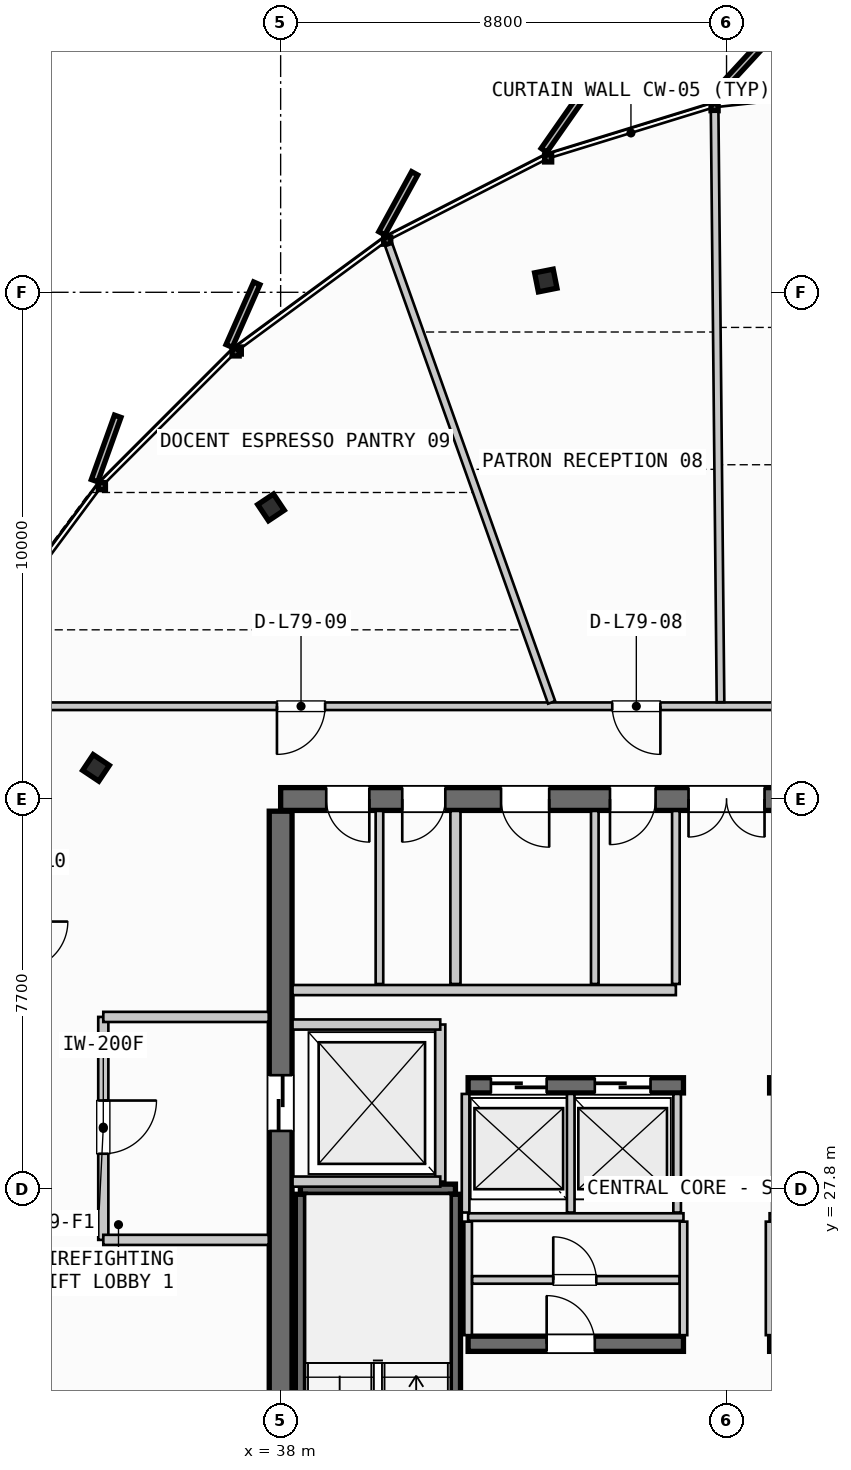
"""IFC4 building model, lengths in metres.
Left out: names, types, materials, properties, quantities, classifications, styles, units other than length and angle.
Written with IfcOpenShell. Run it as: python <this file> out.ifc"""

import sys

from ifc_helpers import new_model, si_unit, direction, frame, frame_2d, origin, origin_2d, place, context, subcontext, project, spatial, rectangle, i_section, extrude, source, transform, mapped, element, fill, save


model = new_model("IFC4")
c1 = context("Model", 3, precision=1e-05, world=origin(), true_north=direction((0.0, 1.0)))
c2 = subcontext(c1, "Body", "Model", "MODEL_VIEW")
j1 = project(units=[si_unit("LENGTHUNIT", "METRE"), si_unit("PLANEANGLEUNIT", "RADIAN")], contexts=[c1])
p1 = place(None, origin())
s1 = spatial("IfcSite", under=j1, at=p1, CompositionType="ELEMENT")
p2 = place(p1, origin())
s2 = spatial("IfcBuilding", under=s1, at=p2, CompositionType="ELEMENT")
p3 = place(p2, frame((0.0, 0.0, 297.4)))
s3 = spatial("IfcBuildingStorey", under=s2, at=p3, CompositionType="ELEMENT", Elevation=297.4)
p4 = place(p3, frame((55.6, 35.5, 0.0), z_axis=(0.0, 0.0, 1.0), x_axis=(-1.0, 0.0, 0.0)))
e1 = element("IfcWall", 1, at=p4, inside=s3, PredefinedType="SHEAR", context=c2, shape_type="SweptSolid", body=[
    extrude(rectangle(XDim=17.6, YDim=0.45, at=frame_2d((8.8, 0.0))), origin(), (0.0, 0.0, 1.0), 3.21),
])
p5 = place(p4, frame((8.05, 0.0, 0.0)))
e2 = element("IfcOpeningElement", 2, at=p5, cuts=e1, PredefinedType="OPENING", context=c2, shape_type="SweptSolid", body=[
    extrude(rectangle(XDim=1.5, YDim=2.2, at=frame_2d((0.75, 1.1))), frame((0.0, 0.235, 0.0), z_axis=(0.0, -1.0, 0.0), x_axis=(1.0, 0.0, 0.0)), (0.0, 0.0, 1.0), 0.47),
])
p6 = place(p4, frame((15.85, 0.0, 0.0)))
e3 = element("IfcOpeningElement", 3, at=p6, cuts=e1, PredefinedType="OPENING", context=c2, shape_type="SweptSolid", body=[
    extrude(rectangle(XDim=0.85, YDim=2.15, at=frame_2d((0.425, 1.075))), frame((0.0, 0.235, 0.0), z_axis=(0.0, -1.0, 0.0), x_axis=(1.0, 0.0, 0.0)), (0.0, 0.0, 1.0), 0.47),
])
p7 = place(p4, frame((14.35, 0.0, 0.0)))
e4 = element("IfcOpeningElement", 4, at=p7, cuts=e1, PredefinedType="OPENING", context=c2, shape_type="SweptSolid", body=[
    extrude(rectangle(XDim=0.85, YDim=2.15, at=frame_2d((0.425, 1.075))), frame((0.0, 0.235, 0.0), z_axis=(0.0, -1.0, 0.0), x_axis=(1.0, 0.0, 0.0)), (0.0, 0.0, 1.0), 0.47),
])
p8 = place(p4, frame((12.3, 0.0, 0.0)))
e5 = element("IfcOpeningElement", 5, at=p8, cuts=e1, PredefinedType="OPENING", context=c2, shape_type="SweptSolid", body=[
    extrude(rectangle(XDim=0.95, YDim=2.15, at=frame_2d((0.475, 1.075))), frame((0.0, 0.235, 0.0), z_axis=(0.0, -1.0, 0.0), x_axis=(1.0, 0.0, 0.0)), (0.0, 0.0, 1.0), 0.47),
])
p9 = place(p4, frame((10.2, 0.0, 0.0)))
e6 = element("IfcOpeningElement", 6, at=p9, cuts=e1, PredefinedType="OPENING", context=c2, shape_type="SweptSolid", body=[
    extrude(rectangle(XDim=0.9, YDim=2.15, at=frame_2d((0.45, 1.075))), frame((0.0, 0.235, 0.0), z_axis=(0.0, -1.0, 0.0), x_axis=(1.0, 0.0, 0.0)), (0.0, 0.0, 1.0), 0.47),
])
p10 = place(p3, frame((38.0, 35.26, 0.0), z_axis=(0.0, 0.0, 1.0), x_axis=(0.0, -1.0, 0.0)))
e7 = element("IfcWall", 7, at=p10, inside=s3, PredefinedType="SHEAR", context=c2, shape_type="SweptSolid", body=[
    extrude(rectangle(XDim=14.92, YDim=0.45, at=frame_2d((7.46, 0.0))), origin(), (0.0, 0.0, 1.0), 3.21),
])
p11 = place(p10, frame((5.21, 0.0, 0.0)))
e8 = element("IfcOpeningElement", 8, at=p11, cuts=e7, PredefinedType="OPENING", context=c2, shape_type="SweptSolid", body=[
    extrude(rectangle(XDim=1.1, YDim=2.2, at=frame_2d((0.55, 1.1))), frame((0.0, 0.235, 0.0), z_axis=(0.0, -1.0, 0.0), x_axis=(1.0, 0.0, 0.0)), (0.0, 0.0, 1.0), 0.47),
])
p12 = place(p3, frame((41.7, 24.75, 0.0), z_axis=(0.0, 0.0, 1.0), x_axis=(1.0, 0.0, 0.0)))
e9 = element("IfcWall", 9, at=p12, inside=s3, PredefinedType="SHEAR", context=c2, shape_type="SweptSolid", body=[
    extrude(rectangle(XDim=4.25, YDim=0.3, at=frame_2d((2.125, 0.0))), origin(), (0.0, 0.0, 1.0), 3.21),
])
p13 = place(p12, frame((1.55, 0.0, 0.0)))
e10 = element("IfcOpeningElement", 10, at=p13, cuts=e9, PredefinedType="OPENING", context=c2, shape_type="SweptSolid", body=[
    extrude(rectangle(XDim=0.95, YDim=2.15, at=frame_2d((0.475, 1.075))), frame((0.0, 0.16, 0.0), z_axis=(0.0, -1.0, 0.0), x_axis=(1.0, 0.0, 0.0)), (0.0, 0.0, 1.0), 0.32),
])
p14 = place(p3, frame((47.65, 24.75, 0.0), z_axis=(0.0, 0.0, 1.0), x_axis=(1.0, 0.0, 0.0)))
e11 = element("IfcWall", 11, at=p14, inside=s3, PredefinedType="SHEAR", context=c2, shape_type="SweptSolid", body=[
    extrude(rectangle(XDim=4.25, YDim=0.3, at=frame_2d((2.125, 0.0))), origin(), (0.0, 0.0, 1.0), 3.21),
])
p15 = place(p14, frame((1.55, 0.0, 0.0)))
e12 = element("IfcOpeningElement", 12, at=p15, cuts=e11, PredefinedType="OPENING", context=c2, shape_type="SweptSolid", body=[
    extrude(rectangle(XDim=0.95, YDim=2.15, at=frame_2d((0.475, 1.075))), frame((0.0, 0.16, 0.0), z_axis=(0.0, -1.0, 0.0), x_axis=(1.0, 0.0, 0.0)), (0.0, 0.0, 1.0), 0.32),
])
p16 = place(p3, frame((41.7, 29.85, 0.0), z_axis=(0.0, 0.0, 1.0), x_axis=(1.0, 0.0, 0.0)))
e13 = element("IfcWall", 13, at=p16, inside=s3, PredefinedType="SHEAR", context=c2, shape_type="SweptSolid", body=[
    extrude(rectangle(XDim=4.25, YDim=0.3, at=frame_2d((2.125, 0.0))), origin(), (0.0, 0.0, 1.0), 3.21),
])
p17 = place(p16, frame((0.45, 0.0, 0.0)))
e14 = element("IfcOpeningElement", 14, at=p17, cuts=e13, PredefinedType="OPENING", context=c2, shape_type="SweptSolid", body=[
    extrude(rectangle(XDim=1.1, YDim=2.2, at=frame_2d((0.55, 1.1))), frame((0.0, 0.16, 0.0), z_axis=(0.0, -1.0, 0.0), x_axis=(1.0, 0.0, 0.0)), (0.0, 0.0, 1.0), 0.32),
])
p18 = place(p16, frame((2.5, 0.0, 0.0)))
e15 = element("IfcOpeningElement", 15, at=p18, cuts=e13, PredefinedType="OPENING", context=c2, shape_type="SweptSolid", body=[
    extrude(rectangle(XDim=1.1, YDim=2.2, at=frame_2d((0.55, 1.1))), frame((0.0, 0.16, 0.0), z_axis=(0.0, -1.0, 0.0), x_axis=(1.0, 0.0, 0.0)), (0.0, 0.0, 1.0), 0.32),
])
p19 = place(p3, frame((47.65, 29.85, 0.0), z_axis=(0.0, 0.0, 1.0), x_axis=(1.0, 0.0, 0.0)))
e16 = element("IfcWall", 16, at=p19, inside=s3, PredefinedType="SHEAR", context=c2, shape_type="SweptSolid", body=[
    extrude(rectangle(XDim=4.25, YDim=0.3, at=frame_2d((2.125, 0.0))), origin(), (0.0, 0.0, 1.0), 3.21),
])
p20 = place(p19, frame((0.45, 0.0, 0.0)))
e17 = element("IfcOpeningElement", 17, at=p20, cuts=e16, PredefinedType="OPENING", context=c2, shape_type="SweptSolid", body=[
    extrude(rectangle(XDim=1.1, YDim=2.2, at=frame_2d((0.55, 1.1))), frame((0.0, 0.16, 0.0), z_axis=(0.0, -1.0, 0.0), x_axis=(1.0, 0.0, 0.0)), (0.0, 0.0, 1.0), 0.32),
])
p21 = place(p19, frame((2.5, 0.0, 0.0)))
e18 = element("IfcOpeningElement", 18, at=p21, cuts=e16, PredefinedType="OPENING", context=c2, shape_type="SweptSolid", body=[
    extrude(rectangle(XDim=1.1, YDim=2.2, at=frame_2d((0.55, 1.1))), frame((0.0, 0.16, 0.0), z_axis=(0.0, -1.0, 0.0), x_axis=(1.0, 0.0, 0.0)), (0.0, 0.0, 1.0), 0.32),
])
m1 = source(origin(), c2, "Body", "SweptSolid", [
    extrude(i_section(OverallWidth=0.374, OverallDepth=0.383, WebThickness=0.017, FlangeThickness=0.026, FilletRadius=0.015, at=origin_2d()), origin(), (0.0, 0.0, 1.0), 3.21),
])
for number, where, z_axis, x_axis in (
    (19, (43.233, 45.732, 0.0), (0.0, 0.0, 1.0), (-0.195, 0.981, 0.0)),
    (20, (37.81, 41.255, 0.0), (0.0, 0.0, 1.0), (-0.556, 0.831, 0.0)),
    (21, (34.356, 36.115, 0.0), (0.0, 0.0, 1.0), (-0.831, 0.556, 0.0)),
):
    element("IfcColumn", number, at=place(p3, frame(where, z_axis=z_axis, x_axis=x_axis)), inside=s3, PredefinedType="COLUMN", context=c2, shape_type="MappedRepresentation", body=[
        mapped(m1, transform((0.0, 0.0, 0.0), scale=1.0)),
    ])
p22 = place(p3, frame((38.39, 27.8, 0.0), z_axis=(0.0, 0.0, 1.0), x_axis=(1.0, 0.0, 0.0)))
e22 = element("IfcWall", 22, at=p22, inside=s3, PredefinedType="SHEAR", context=c2, shape_type="SweptSolid", body=[
    extrude(rectangle(XDim=3.06, YDim=0.2, at=frame_2d((1.53, 0.0))), origin(), (0.0, 0.0, 1.0), 3.21),
])
for number, where, z_axis, x_axis in (
    (23, (41.45, 27.7, 0.0), (0.0, 0.0, 1.0), (0.0, -1.0, 0.0)),
    (24, (38.39, 20.35, 0.0), (0.0, 0.0, 1.0), (0.0, 1.0, 0.0)),
):
    element("IfcWall", number, at=place(p3, frame(where, z_axis=z_axis, x_axis=x_axis)), inside=s3, PredefinedType="SHEAR", context=c2, shape_type="SweptSolid", body=[
        extrude(rectangle(XDim=7.35, YDim=0.2, at=frame_2d((3.675, 0.0))), origin(), (0.0, 0.0, 1.0), 3.21),
    ])
p23 = place(p3, frame((41.15, 27.95, 0.0), z_axis=(0.0, 0.0, 1.0), x_axis=(0.0, 1.0, 0.0)))
e25 = element("IfcWall", 25, at=p23, inside=s3, PredefinedType="PARTITIONING", context=c2, shape_type="SweptSolid", body=[
    extrude(rectangle(XDim=3.1, YDim=0.2, at=frame_2d((1.55, 0.0))), origin(), (0.0, 0.0, 1.0), 2.28),
])
for number, where, z_axis, x_axis in (
    (26, (38.235, 27.95, 0.0), (0.0, 0.0, 1.0), (1.0, 0.0, 0.0)),
    (27, (38.235, 31.05, 0.0), (0.0, 0.0, 1.0), (1.0, 0.0, 0.0)),
):
    element("IfcWall", number, at=place(p3, frame(where, z_axis=z_axis, x_axis=x_axis)), inside=s3, PredefinedType="PARTITIONING", context=c2, shape_type="SweptSolid", body=[
        extrude(rectangle(XDim=2.915, YDim=0.2, at=frame_2d((1.458, 0.0))), origin(), (0.0, 0.0, 1.0), 2.28),
    ])
p24 = place(p3, frame((34.5, 31.2, 0.0), z_axis=(0.0, 0.0, 1.0), x_axis=(0.0, -1.0, 0.0)))
e28 = element("IfcWall", 28, at=p24, inside=s3, PredefinedType="PARTITIONING", context=c2, shape_type="SweptSolid", body=[
    extrude(rectangle(XDim=4.4, YDim=0.2, at=frame_2d((2.2, 0.0))), origin(), (0.0, 0.0, 1.0), 2.28),
])
p25 = place(p24, frame((1.65, 0.0, 0.0)))
e29 = element("IfcOpeningElement", 29, at=p25, cuts=e28, PredefinedType="OPENING", context=c2, shape_type="SweptSolid", body=[
    extrude(rectangle(XDim=1.05, YDim=2.15, at=frame_2d((0.525, 1.075))), frame((0.0, 0.11, 0.0), z_axis=(0.0, -1.0, 0.0), x_axis=(1.0, 0.0, 0.0)), (0.0, 0.0, 1.0), 0.22),
])
for number, where, z_axis, x_axis in (
    (30, (34.5, 26.8, 0.0), (0.0, 0.0, 1.0), (1.0, 0.0, 0.0)),
    (31, (34.5, 31.2, 0.0), (0.0, 0.0, 1.0), (1.0, 0.0, 0.0)),
):
    element("IfcWall", number, at=place(p3, frame(where, z_axis=z_axis, x_axis=x_axis)), inside=s3, PredefinedType="PARTITIONING", context=c2, shape_type="SweptSolid", body=[
        extrude(rectangle(XDim=3.265, YDim=0.2, at=frame_2d((1.632, 0.0))), origin(), (0.0, 0.0, 1.0), 2.28),
    ])
for number, where, z_axis, x_axis in (
    (32, (41.7, 27.25, 0.0), (0.0, 0.0, 1.0), (1.0, 0.0, 0.0)),
    (33, (47.65, 27.25, 0.0), (0.0, 0.0, 1.0), (1.0, 0.0, 0.0)),
):
    element("IfcWall", number, at=place(p3, frame(where, z_axis=z_axis, x_axis=x_axis)), inside=s3, PredefinedType="PARTITIONING", context=c2, shape_type="SweptSolid", body=[
        extrude(rectangle(XDim=4.25, YDim=0.15, at=frame_2d((2.125, 0.0))), origin(), (0.0, 0.0, 1.0), 2.28),
    ])
for number, where, z_axis, x_axis in (
    (34, (41.7, 24.92, 0.0), (0.0, 0.0, 1.0), (0.0, 1.0, 0.0)),
    (35, (45.95, 24.92, 0.0), (0.0, 0.0, 1.0), (0.0, 1.0, 0.0)),
    (36, (47.65, 24.92, 0.0), (0.0, 0.0, 1.0), (0.0, 1.0, 0.0)),
):
    element("IfcWall", number, at=place(p3, frame(where, z_axis=z_axis, x_axis=x_axis)), inside=s3, PredefinedType="PARTITIONING", context=c2, shape_type="SweptSolid", body=[
        extrude(rectangle(XDim=2.24, YDim=0.15, at=frame_2d((1.12, 0.0))), origin(), (0.0, 0.0, 1.0), 2.28),
    ])
p26 = place(p3, frame((41.78, 26.01, 0.0), z_axis=(0.0, 0.0, 1.0), x_axis=(1.0, 0.0, 0.0)))
e37 = element("IfcWall", 37, at=p26, inside=s3, PredefinedType="PARTITIONING", context=c2, shape_type="SweptSolid", body=[
    extrude(rectangle(XDim=4.09, YDim=0.15, at=frame_2d((2.045, 0.0))), origin(), (0.0, 0.0, 1.0), 2.28),
])
p27 = place(p26, frame((1.6, 0.0, 0.0)))
e38 = element("IfcOpeningElement", 38, at=p27, cuts=e37, PredefinedType="OPENING", context=c2, shape_type="SweptSolid", body=[
    extrude(rectangle(XDim=0.85, YDim=2.15, at=frame_2d((0.425, 1.075))), frame((0.0, 0.085, 0.0), z_axis=(0.0, -1.0, 0.0), x_axis=(1.0, 0.0, 0.0)), (0.0, 0.0, 1.0), 0.17),
])
for number, where, z_axis, x_axis in (
    (39, (41.65, 27.34, 0.0), (0.0, 0.0, 1.0), (0.0, 1.0, 0.0)),
    (40, (43.725, 27.34, 0.0), (0.0, 0.0, 1.0), (0.0, 1.0, 0.0)),
    (41, (45.825, 27.34, 0.0), (0.0, 0.0, 1.0), (0.0, 1.0, 0.0)),
):
    element("IfcWall", number, at=place(p3, frame(where, z_axis=z_axis, x_axis=x_axis)), inside=s3, PredefinedType="PARTITIONING", context=c2, shape_type="SweptSolid", body=[
        extrude(rectangle(XDim=2.34, YDim=0.15, at=frame_2d((1.17, 0.0))), origin(), (0.0, 0.0, 1.0), 2.28),
    ])
p28 = place(p3, frame((41.45, 31.85, 0.0), z_axis=(0.0, 0.0, 1.0), x_axis=(0.0, 1.0, 0.0)))
e42 = element("IfcWall", 42, at=p28, inside=s3, PredefinedType="PARTITIONING", context=c2, shape_type="SweptSolid", body=[
    extrude(rectangle(XDim=3.415, YDim=0.2, at=frame_2d((1.708, 0.0))), origin(), (0.0, 0.0, 1.0), 2.28),
])
p29 = place(p3, frame((38.235, 31.73, 0.0), z_axis=(0.0, 0.0, 1.0), x_axis=(1.0, 0.0, 0.0)))
e43 = element("IfcWall", 43, at=p29, inside=s3, PredefinedType="PARTITIONING", context=c2, shape_type="SweptSolid", body=[
    extrude(rectangle(XDim=7.565, YDim=0.2, at=frame_2d((3.782, 0.0))), origin(), (0.0, 0.0, 1.0), 2.28),
])
for number, where, z_axis, x_axis in (
    (44, (45.8, 31.85, 0.0), (0.0, 0.0, 1.0), (0.0, 1.0, 0.0)),
    (45, (39.95, 31.85, 0.0), (0.0, 0.0, 1.0), (0.0, 1.0, 0.0)),
):
    element("IfcWall", number, at=place(p3, frame(where, z_axis=z_axis, x_axis=x_axis)), inside=s3, PredefinedType="PARTITIONING", context=c2, shape_type="SweptSolid", body=[
        extrude(rectangle(XDim=3.415, YDim=0.15, at=frame_2d((1.708, 0.0))), origin(), (0.0, 0.0, 1.0), 2.28),
    ])
p30 = place(p3, frame((44.2, 31.85, 0.0), z_axis=(0.0, 0.0, 1.0), x_axis=(0.0, 1.0, 0.0)))
e46 = element("IfcWall", 46, at=p30, inside=s3, PredefinedType="PLUMBINGWALL", context=c2, shape_type="SweptSolid", body=[
    extrude(rectangle(XDim=3.415, YDim=0.15, at=frame_2d((1.708, 0.0))), origin(), (0.0, 0.0, 1.0), 2.28),
])
p31 = place(p3, frame((60.888, 37.331, 0.0), z_axis=(0.0, 0.0, 1.0), x_axis=(-1.0, 0.0, 0.0)))
e47 = element("IfcWall", 47, at=p31, inside=s3, PredefinedType="PARTITIONING", context=c2, shape_type="SweptSolid", body=[
    extrude(rectangle(XDim=28.038, YDim=0.15, at=frame_2d((14.019, 0.0))), origin(), (0.0, 0.0, 1.0), 2.28),
])
p32 = place(p31, frame((3.903, 0.0, 0.0)))
e48 = element("IfcOpeningElement", 48, at=p32, cuts=e47, PredefinedType="OPENING", context=c2, shape_type="SweptSolid", body=[
    extrude(rectangle(XDim=0.95, YDim=2.15, at=frame_2d((0.475, 1.075))), frame((0.0, 0.085, 0.0), z_axis=(0.0, -1.0, 0.0), x_axis=(1.0, 0.0, 0.0)), (0.0, 0.0, 1.0), 0.17),
])
p33 = place(p31, frame((9.534, 0.0, 0.0)))
e49 = element("IfcOpeningElement", 49, at=p33, cuts=e47, PredefinedType="OPENING", context=c2, shape_type="SweptSolid", body=[
    extrude(rectangle(XDim=0.95, YDim=2.15, at=frame_2d((0.475, 1.075))), frame((0.0, 0.085, 0.0), z_axis=(0.0, -1.0, 0.0), x_axis=(1.0, 0.0, 0.0)), (0.0, 0.0, 1.0), 0.17),
])
p34 = place(p31, frame((15.393, 0.0, 0.0)))
e50 = element("IfcOpeningElement", 50, at=p34, cuts=e47, PredefinedType="OPENING", context=c2, shape_type="SweptSolid", body=[
    extrude(rectangle(XDim=0.95, YDim=2.15, at=frame_2d((0.475, 1.075))), frame((0.0, 0.085, 0.0), z_axis=(0.0, -1.0, 0.0), x_axis=(1.0, 0.0, 0.0)), (0.0, 0.0, 1.0), 0.17),
])
p35 = place(p31, frame((22.011, 0.0, 0.0)))
e51 = element("IfcOpeningElement", 51, at=p35, cuts=e47, PredefinedType="OPENING", context=c2, shape_type="SweptSolid", body=[
    extrude(rectangle(XDim=0.95, YDim=2.15, at=frame_2d((0.475, 1.075))), frame((0.0, 0.085, 0.0), z_axis=(0.0, -1.0, 0.0), x_axis=(1.0, 0.0, 0.0)), (0.0, 0.0, 1.0), 0.17),
])
p36 = place(p3, frame((46.681, 37.411, 0.0), z_axis=(0.0, 0.0, 1.0), x_axis=(-0.00999384371, 0.999950060297, 0.0)))
e52 = element("IfcWall", 52, at=p36, inside=s3, PredefinedType="PARTITIONING", context=c2, shape_type="SweptSolid", body=[
    extrude(rectangle(XDim=11.653, YDim=0.15, at=frame_2d((5.826, 0.0))), origin(), (0.0, 0.0, 1.0), 2.28),
])
p37 = place(p3, frame((43.348, 37.406, 0.0), z_axis=(0.0, 0.0, 1.0), x_axis=(-0.335438877296, 0.94206197227, 0.0)))
e53 = element("IfcWall", 53, at=p37, inside=s3, PredefinedType="PARTITIONING", context=c2, shape_type="SweptSolid", body=[
    extrude(rectangle(XDim=9.583, YDim=0.15, at=frame_2d((4.791, 0.0))), origin(), (0.0, 0.0, 1.0), 2.28),
])
m2 = source(origin(), c2, "Body", "SweptSolid", [
    extrude(rectangle(XDim=1.5, YDim=2.2, at=frame_2d((0.75, 1.1))), frame((0.0, 0.025, 0.0), z_axis=(0.0, -1.0, 0.0), x_axis=(1.0, 0.0, 0.0)), (0.0, 0.0, 1.0), 0.05),
])
p38 = place(p5, origin())
e54 = element("IfcDoor", 54, at=p38, inside=s3, OperationType="DOUBLE_DOOR_SINGLE_SWING", PredefinedType="DOOR", context=c2, shape_type="MappedRepresentation", body=[
    mapped(m2, transform((0.0, 0.0, 0.0), scale=1.0)),
])
fill(e2, e54)
m3 = source(origin(), c2, "Body", "SweptSolid", [
    extrude(rectangle(XDim=1.1, YDim=2.2, at=frame_2d((0.55, 1.1))), frame((0.0, 0.025, 0.0), z_axis=(0.0, -1.0, 0.0), x_axis=(1.0, 0.0, 0.0)), (0.0, 0.0, 1.0), 0.05),
])
p39 = place(p11, origin())
e55 = element("IfcDoor", 55, at=p39, inside=s3, OperationType="SLIDING_TO_LEFT", PredefinedType="DOOR", context=c2, shape_type="MappedRepresentation", body=[
    mapped(m3, transform((0.0, 0.0, 0.0), scale=1.0)),
])
fill(e8, e55)
m4 = source(origin(), c2, "Body", "SweptSolid", [
    extrude(rectangle(XDim=0.95, YDim=2.15, at=frame_2d((0.475, 1.075))), frame((0.0, 0.025, 0.0), z_axis=(0.0, -1.0, 0.0), x_axis=(1.0, 0.0, 0.0)), (0.0, 0.0, 1.0), 0.05),
])
p40 = place(p13, origin())
e56 = element("IfcDoor", 56, at=p40, inside=s3, OperationType="SINGLE_SWING_LEFT", PredefinedType="DOOR", context=c2, shape_type="MappedRepresentation", body=[
    mapped(m4, transform((0.0, 0.0, 0.0), scale=1.0)),
])
fill(e10, e56)
p41 = place(p17, origin())
e57 = element("IfcDoor", 57, at=p41, inside=s3, OperationType="SLIDING_TO_LEFT", PredefinedType="DOOR", context=c2, shape_type="MappedRepresentation", body=[
    mapped(m3, transform((0.0, 0.0, 0.0), scale=1.0)),
])
fill(e14, e57)
p42 = place(p18, origin())
e58 = element("IfcDoor", 58, at=p42, inside=s3, OperationType="SLIDING_TO_LEFT", PredefinedType="DOOR", context=c2, shape_type="MappedRepresentation", body=[
    mapped(m3, transform((0.0, 0.0, 0.0), scale=1.0)),
])
fill(e15, e58)
m5 = source(origin(), c2, "Body", "SweptSolid", [
    extrude(rectangle(XDim=0.85, YDim=2.15, at=frame_2d((0.425, 1.075))), frame((0.0, 0.025, 0.0), z_axis=(0.0, -1.0, 0.0), x_axis=(1.0, 0.0, 0.0)), (0.0, 0.0, 1.0), 0.05),
])
p43 = place(p6, origin())
e59 = element("IfcDoor", 59, at=p43, inside=s3, OperationType="SINGLE_SWING_LEFT", PredefinedType="DOOR", context=c2, shape_type="MappedRepresentation", body=[
    mapped(m5, transform((0.0, 0.0, 0.0), scale=1.0)),
])
fill(e3, e59)
p44 = place(p7, origin())
e60 = element("IfcDoor", 60, at=p44, inside=s3, OperationType="SINGLE_SWING_RIGHT", PredefinedType="DOOR", context=c2, shape_type="MappedRepresentation", body=[
    mapped(m5, transform((0.0, 0.0, 0.0), scale=1.0)),
])
fill(e4, e60)
p45 = place(p8, origin())
e61 = element("IfcDoor", 61, at=p45, inside=s3, OperationType="SINGLE_SWING_LEFT", PredefinedType="DOOR", context=c2, shape_type="MappedRepresentation", body=[
    mapped(m4, transform((0.0, 0.0, 0.0), scale=1.0)),
])
fill(e5, e61)
m6 = source(origin(), c2, "Body", "SweptSolid", [
    extrude(rectangle(XDim=0.9, YDim=2.15, at=frame_2d((0.45, 1.075))), frame((0.0, 0.025, 0.0), z_axis=(0.0, -1.0, 0.0), x_axis=(1.0, 0.0, 0.0)), (0.0, 0.0, 1.0), 0.05),
])
p46 = place(p9, origin())
e62 = element("IfcDoor", 62, at=p46, inside=s3, OperationType="SINGLE_SWING_RIGHT", PredefinedType="DOOR", context=c2, shape_type="MappedRepresentation", body=[
    mapped(m6, transform((0.0, 0.0, 0.0), scale=1.0)),
])
fill(e6, e62)
m7 = source(origin(), c2, "Body", "SweptSolid", [
    extrude(rectangle(XDim=1.05, YDim=2.15, at=frame_2d((0.525, 1.075))), frame((0.0, 0.025, 0.0), z_axis=(0.0, -1.0, 0.0), x_axis=(1.0, 0.0, 0.0)), (0.0, 0.0, 1.0), 0.05),
])
p47 = place(p25, origin())
e63 = element("IfcDoor", 63, at=p47, inside=s3, OperationType="SINGLE_SWING_LEFT", PredefinedType="DOOR", context=c2, shape_type="MappedRepresentation", body=[
    mapped(m7, transform((0.0, 0.0, 0.0), scale=1.0)),
])
fill(e29, e63)
p48 = place(p27, origin())
e64 = element("IfcDoor", 64, at=p48, inside=s3, OperationType="SINGLE_SWING_LEFT", PredefinedType="DOOR", context=c2, shape_type="MappedRepresentation", body=[
    mapped(m5, transform((0.0, 0.0, 0.0), scale=1.0)),
])
fill(e38, e64)
p49 = place(p34, origin())
e65 = element("IfcDoor", 65, at=p49, inside=s3, OperationType="SINGLE_SWING_LEFT", PredefinedType="DOOR", context=c2, shape_type="MappedRepresentation", body=[
    mapped(m4, transform((0.0, 0.0, 0.0), scale=1.0)),
])
fill(e50, e65)
p50 = place(p35, origin())
e66 = element("IfcDoor", 66, at=p50, inside=s3, OperationType="SINGLE_SWING_RIGHT", PredefinedType="DOOR", context=c2, shape_type="MappedRepresentation", body=[
    mapped(m4, transform((0.0, 0.0, 0.0), scale=1.0)),
])
fill(e51, e66)
save(model, sys.argv[1])
